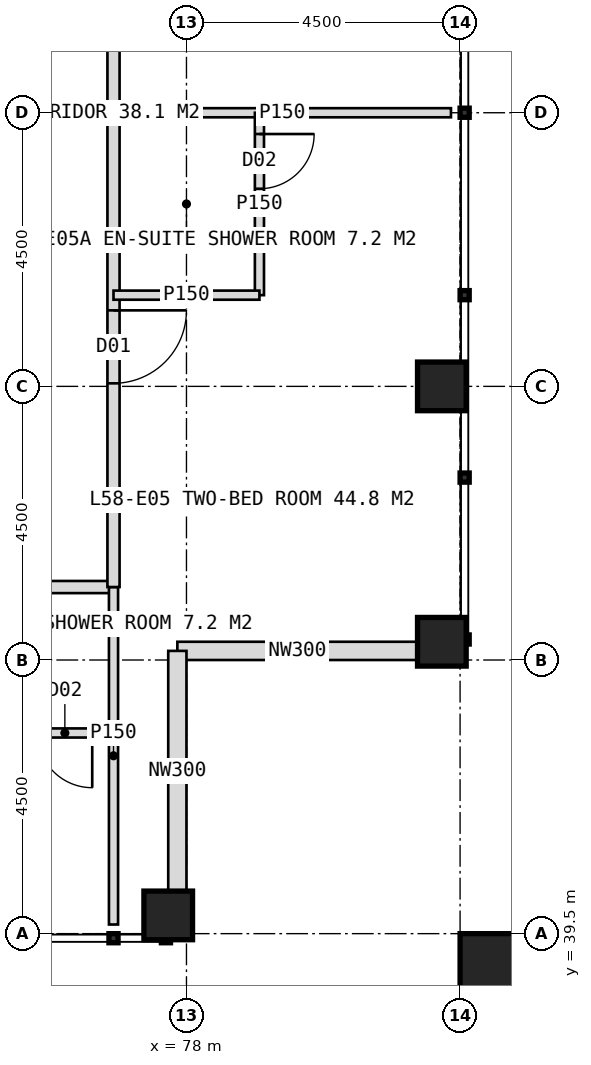
"""IFC4 building model, lengths in metres.
Left out: names, types, materials, properties, quantities, classifications, styles, units other than length and angle.
Written with IfcOpenShell. Run it as: python <this file> out.ifc"""

import sys

from ifc_helpers import new_model, si_unit, direction, frame, frame_2d, origin, origin_2d, place, context, subcontext, project, spatial, rectangle, hollow_rectangle, extrude, element, fill, save


model = new_model("IFC4")
c1 = context("Model", 3, precision=1e-05, world=origin(), true_north=direction((0.0, 1.0)))
c2 = subcontext(c1, "Body", "Model", "MODEL_VIEW")
j1 = project(units=[si_unit("LENGTHUNIT", "METRE"), si_unit("PLANEANGLEUNIT", "RADIAN")], contexts=[c1])
p1 = place(None, origin())
s1 = spatial("IfcSite", under=j1, at=p1, CompositionType="ELEMENT")
p2 = place(p1, origin())
s2 = spatial("IfcBuilding", under=s1, at=p2, CompositionType="ELEMENT")
p3 = place(p2, frame((0.0, 0.0, 241.0)))
s3 = spatial("IfcBuildingStorey", under=s2, at=p3, CompositionType="ELEMENT", Elevation=241.0)
for number, where, z_axis, x_axis in (
    (1, (82.2, 44.3, 0.0), (0.0, 0.0, 1.0), (1.0, 0.0, 0.0)),
    (2, (82.2, 48.5, 0.0), (0.0, 0.0, 1.0), (1.0, 0.0, 0.0)),
    (3, (77.7, 39.8, 0.0), (0.0, 0.0, 1.0), (1.0, 0.0, 0.0)),
):
    element("IfcColumn", number, at=place(p3, frame(where, z_axis=z_axis, x_axis=x_axis)), inside=s3, PredefinedType="COLUMN", context=c2, shape_type="SweptSolid", body=[
        extrude(hollow_rectangle(XDim=0.8, YDim=0.8, WallThickness=0.08, at=origin_2d()), origin(), (0.0, 0.0, 1.0), 4.0),
    ])
p4 = place(p3, frame((83.1, 38.9, 0.0), z_axis=(0.0, 0.0, 1.0), x_axis=(1.0, 0.0, 0.0)))
e4 = element("IfcColumn", 4, at=p4, inside=s3, PredefinedType="COLUMN", context=c2, shape_type="SweptSolid", body=[
    extrude(hollow_rectangle(XDim=1.2, YDim=1.2, WallThickness=0.07, at=origin_2d()), origin(), (0.0, 0.0, 1.0), 2.0),
])
for number, where, z_axis, x_axis in (
    (5, (81.8, 44.15, 0.0), (0.0, 0.0, 1.0), (-1.0, 0.0, 0.0)),
    (6, (77.85, 44.15, 0.0), (0.0, 0.0, 1.0), (0.0, -1.0, 0.0)),
):
    element("IfcWall", number, at=place(p3, frame(where, z_axis=z_axis, x_axis=x_axis)), inside=s3, PredefinedType="ELEMENTEDWALL", context=c2, shape_type="SweptSolid", body=[
        extrude(rectangle(XDim=3.95, YDim=0.3, at=frame_2d((1.975, 0.0))), origin(), (0.0, 0.0, 1.0), 2.95),
    ])
p5 = place(p3, frame((76.8, 45.2, 0.0), z_axis=(0.0, 0.0, 1.0), x_axis=(-1.0, 0.0, 0.0)))
e7 = element("IfcWall", 7, at=p5, inside=s3, PredefinedType="PARTITIONING", context=c2, shape_type="SweptSolid", body=[
    extrude(rectangle(XDim=33.6, YDim=0.2, at=frame_2d((16.8, 0.0))), origin(), (0.0, 0.0, 1.0), 3.75),
])
p6 = place(p5, frame((3.25, 0.0, 0.0)))
e8 = element("IfcOpeningElement", 8, at=p6, cuts=e7, PredefinedType="OPENING", context=c2, shape_type="SweptSolid", body=[
    extrude(rectangle(XDim=1.2, YDim=2.2, at=frame_2d((0.6, 1.1))), frame((0.0, 0.11, 0.0), z_axis=(0.0, -1.0, 0.0), x_axis=(1.0, 0.0, 0.0)), (0.0, 0.0, 1.0), 0.22),
])
p7 = place(p5, frame((11.05, 0.0, 0.0)))
e9 = element("IfcOpeningElement", 9, at=p7, cuts=e7, PredefinedType="OPENING", context=c2, shape_type="SweptSolid", body=[
    extrude(rectangle(XDim=1.2, YDim=2.2, at=frame_2d((0.6, 1.1))), frame((0.0, 0.11, 0.0), z_axis=(0.0, -1.0, 0.0), x_axis=(1.0, 0.0, 0.0)), (0.0, 0.0, 1.0), 0.22),
])
p8 = place(p5, frame((19.45, 0.0, 0.0)))
e10 = element("IfcOpeningElement", 10, at=p8, cuts=e7, PredefinedType="OPENING", context=c2, shape_type="SweptSolid", body=[
    extrude(rectangle(XDim=1.2, YDim=2.2, at=frame_2d((0.6, 1.1))), frame((0.0, 0.11, 0.0), z_axis=(0.0, -1.0, 0.0), x_axis=(1.0, 0.0, 0.0)), (0.0, 0.0, 1.0), 0.22),
])
p9 = place(p5, frame((25.45, 0.0, 0.0)))
e11 = element("IfcOpeningElement", 11, at=p9, cuts=e7, PredefinedType="OPENING", context=c2, shape_type="SweptSolid", body=[
    extrude(rectangle(XDim=1.2, YDim=2.2, at=frame_2d((0.6, 1.1))), frame((0.0, 0.11, 0.0), z_axis=(0.0, -1.0, 0.0), x_axis=(1.0, 0.0, 0.0)), (0.0, 0.0, 1.0), 0.22),
])
p10 = place(p3, frame((76.8, 45.2, 0.0), z_axis=(0.0, 0.0, 1.0), x_axis=(0.0, -1.0, 0.0)))
e12 = element("IfcWall", 12, at=p10, inside=s3, PredefinedType="PARTITIONING", context=c2, shape_type="SweptSolid", body=[
    extrude(rectangle(XDim=5.55, YDim=0.15, at=frame_2d((2.775, 0.0))), origin(), (0.0, 0.0, 1.0), 3.75),
])
p11 = place(p3, frame((76.8, 42.8, 0.0), z_axis=(0.0, 0.0, 1.0), x_axis=(-1.0, 0.0, 0.0)))
e13 = element("IfcWall", 13, at=p11, inside=s3, PredefinedType="PARTITIONING", context=c2, shape_type="SweptSolid", body=[
    extrude(rectangle(XDim=3.0, YDim=0.15, at=frame_2d((1.5, 0.0))), origin(), (0.0, 0.0, 1.0), 3.75),
])
p12 = place(p11, frame((0.35, 0.0, 0.0)))
e14 = element("IfcOpeningElement", 14, at=p12, cuts=e13, PredefinedType="OPENING", context=c2, shape_type="SweptSolid", body=[
    extrude(rectangle(XDim=0.9, YDim=2.1, at=frame_2d((0.45, 1.05))), frame((0.0, 0.085, 0.0), z_axis=(0.0, -1.0, 0.0), x_axis=(1.0, 0.0, 0.0)), (0.0, 0.0, 1.0), 0.17),
])
p13 = place(p3, frame((76.8, 53.0, 0.0), z_axis=(0.0, 0.0, 1.0), x_axis=(1.0, 0.0, 0.0)))
e15 = element("IfcWall", 15, at=p13, inside=s3, PredefinedType="PARTITIONING", context=c2, shape_type="SweptSolid", body=[
    extrude(rectangle(XDim=5.55, YDim=0.15, at=frame_2d((2.775, 0.0))), origin(), (0.0, 0.0, 1.0), 3.75),
])
p14 = place(p3, frame((76.8, 78.8, 0.0), z_axis=(0.0, 0.0, 1.0), x_axis=(0.0, -1.0, 0.0)))
e16 = element("IfcWall", 16, at=p14, inside=s3, PredefinedType="PARTITIONING", context=c2, shape_type="SweptSolid", body=[
    extrude(rectangle(XDim=33.6, YDim=0.2, at=frame_2d((16.8, 0.0))), origin(), (0.0, 0.0, 1.0), 3.75),
])
p15 = place(p14, frame((2.65, 0.0, 0.0)))
e17 = element("IfcOpeningElement", 17, at=p15, cuts=e16, PredefinedType="OPENING", context=c2, shape_type="SweptSolid", body=[
    extrude(rectangle(XDim=1.2, YDim=2.2, at=frame_2d((0.6, 1.1))), frame((0.0, 0.11, 0.0), z_axis=(0.0, -1.0, 0.0), x_axis=(1.0, 0.0, 0.0)), (0.0, 0.0, 1.0), 0.22),
])
p16 = place(p14, frame((7.45, 0.0, 0.0)))
e18 = element("IfcOpeningElement", 18, at=p16, cuts=e16, PredefinedType="OPENING", context=c2, shape_type="SweptSolid", body=[
    extrude(rectangle(XDim=1.2, YDim=2.2, at=frame_2d((0.6, 1.1))), frame((0.0, 0.11, 0.0), z_axis=(0.0, -1.0, 0.0), x_axis=(1.0, 0.0, 0.0)), (0.0, 0.0, 1.0), 0.22),
])
p17 = place(p14, frame((13.45, 0.0, 0.0)))
e19 = element("IfcOpeningElement", 19, at=p17, cuts=e16, PredefinedType="OPENING", context=c2, shape_type="SweptSolid", body=[
    extrude(rectangle(XDim=1.2, YDim=2.2, at=frame_2d((0.6, 1.1))), frame((0.0, 0.11, 0.0), z_axis=(0.0, -1.0, 0.0), x_axis=(1.0, 0.0, 0.0)), (0.0, 0.0, 1.0), 0.22),
])
p18 = place(p14, frame((20.05, 0.0, 0.0)))
e20 = element("IfcOpeningElement", 20, at=p18, cuts=e16, PredefinedType="OPENING", context=c2, shape_type="SweptSolid", body=[
    extrude(rectangle(XDim=1.2, YDim=2.2, at=frame_2d((0.6, 1.1))), frame((0.0, 0.11, 0.0), z_axis=(0.0, -1.0, 0.0), x_axis=(1.0, 0.0, 0.0)), (0.0, 0.0, 1.0), 0.22),
])
p19 = place(p14, frame((29.05, 0.0, 0.0)))
e21 = element("IfcOpeningElement", 21, at=p19, cuts=e16, PredefinedType="OPENING", context=c2, shape_type="SweptSolid", body=[
    extrude(rectangle(XDim=1.2, YDim=2.2, at=frame_2d((0.6, 1.1))), frame((0.0, 0.11, 0.0), z_axis=(0.0, -1.0, 0.0), x_axis=(1.0, 0.0, 0.0)), (0.0, 0.0, 1.0), 0.22),
])
p20 = place(p3, frame((79.2, 53.0, 0.0), z_axis=(0.0, 0.0, 1.0), x_axis=(0.0, -1.0, 0.0)))
e22 = element("IfcWall", 22, at=p20, inside=s3, PredefinedType="PARTITIONING", context=c2, shape_type="SweptSolid", body=[
    extrude(rectangle(XDim=3.0, YDim=0.15, at=frame_2d((1.5, 0.0))), origin(), (0.0, 0.0, 1.0), 3.75),
])
p21 = place(p20, frame((0.35, 0.0, 0.0)))
e23 = element("IfcOpeningElement", 23, at=p21, cuts=e22, PredefinedType="OPENING", context=c2, shape_type="SweptSolid", body=[
    extrude(rectangle(XDim=0.9, YDim=2.1, at=frame_2d((0.45, 1.05))), frame((0.0, 0.085, 0.0), z_axis=(0.0, -1.0, 0.0), x_axis=(1.0, 0.0, 0.0)), (0.0, 0.0, 1.0), 0.17),
])
p22 = place(p3, frame((76.8, 50.0, 0.0), z_axis=(0.0, 0.0, 1.0), x_axis=(1.0, 0.0, 0.0)))
e24 = element("IfcWall", 24, at=p22, inside=s3, PredefinedType="PARTITIONING", context=c2, shape_type="SweptSolid", body=[
    extrude(rectangle(XDim=2.4, YDim=0.15, at=frame_2d((1.2, 0.0))), origin(), (0.0, 0.0, 1.0), 3.75),
])
p23 = place(p12, origin())
e25 = element("IfcDoor", 25, at=p23, inside=s3, OperationType="SINGLE_SWING_LEFT", PredefinedType="DOOR", context=c2, shape_type="SweptSolid", body=[
    extrude(rectangle(XDim=0.9, YDim=2.1, at=frame_2d((0.45, 1.05))), frame((0.0, 0.025, 0.0), z_axis=(0.0, -1.0, 0.0), x_axis=(1.0, 0.0, 0.0)), (0.0, 0.0, 1.0), 0.05),
])
fill(e14, e25)
p24 = place(p19, origin())
e26 = element("IfcDoor", 26, at=p24, inside=s3, OperationType="SINGLE_SWING_LEFT", PredefinedType="DOOR", context=c2, shape_type="SweptSolid", body=[
    extrude(rectangle(XDim=1.2, YDim=2.2, at=frame_2d((0.6, 1.1))), frame((0.0, 0.025, 0.0), z_axis=(0.0, -1.0, 0.0), x_axis=(1.0, 0.0, 0.0)), (0.0, 0.0, 1.0), 0.05),
])
fill(e21, e26)
p25 = place(p21, origin())
e27 = element("IfcDoor", 27, at=p25, inside=s3, OperationType="SINGLE_SWING_LEFT", PredefinedType="DOOR", context=c2, shape_type="SweptSolid", body=[
    extrude(rectangle(XDim=0.9, YDim=2.1, at=frame_2d((0.45, 1.05))), frame((0.0, 0.025, 0.0), z_axis=(0.0, -1.0, 0.0), x_axis=(1.0, 0.0, 0.0)), (0.0, 0.0, 1.0), 0.05),
])
fill(e23, e27)
save(model, sys.argv[1])
